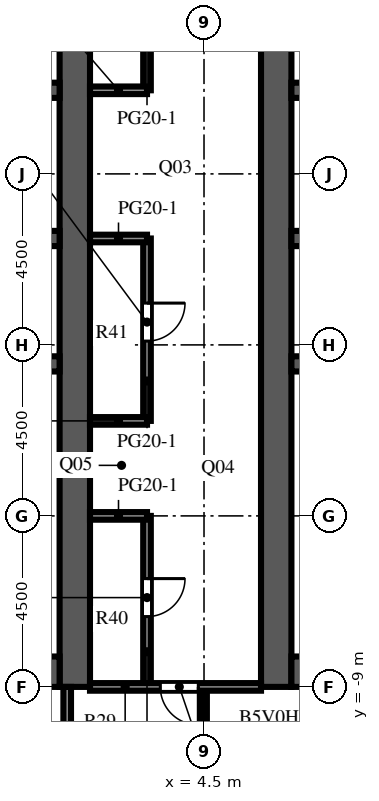
"""IFC4 building model, lengths in metres.
Left out: names, types, materials, properties, quantities, classifications, styles, units other than length and angle.
Written with IfcOpenShell. Run it as: python <this file> out.ifc"""

import sys

from ifc_helpers import new_model, si_unit, direction, frame, frame_2d, origin, place, context, subcontext, project, spatial, rectangle, extrude, element, fill, save


model = new_model("IFC4")
c1 = context("Model", 3, precision=1e-05, world=origin(), true_north=direction((0.0, 1.0)))
c2 = subcontext(c1, "Body", "Model", "MODEL_VIEW")
j1 = project(units=[si_unit("LENGTHUNIT", "METRE"), si_unit("PLANEANGLEUNIT", "RADIAN")], contexts=[c1])
p1 = place(None, origin())
s1 = spatial("IfcSite", under=j1, at=p1, CompositionType="ELEMENT")
p2 = place(p1, origin())
s2 = spatial("IfcBuilding", under=s1, at=p2, CompositionType="ELEMENT")
p3 = place(p2, frame((0.0, 0.0, 156.8)))
s3 = spatial("IfcBuildingStorey", under=s2, at=p3, CompositionType="ELEMENT", Elevation=156.8)
p4 = place(p3, frame((1.1, -9.0, 0.0), z_axis=(0.0, 0.0, 1.0), x_axis=(0.0, 1.0, 0.0)))
e1 = element("IfcWall", 1, at=p4, inside=s3, PredefinedType="SHEAR", context=c2, shape_type="SweptSolid", body=[
    extrude(rectangle(XDim=27.5, YDim=0.8, at=frame_2d((13.75, 0.0))), origin(), (0.0, 0.0, 1.0), 4.1),
])
p5 = place(p4, frame((12.55, 0.0, 0.0)))
e2 = element("IfcOpeningElement", 2, at=p5, cuts=e1, PredefinedType="OPENING", context=c2, shape_type="SweptSolid", body=[
    extrude(rectangle(XDim=2.4, YDim=2.4, at=frame_2d((1.2, 1.2))), frame((0.0, 0.41, 0.0), z_axis=(0.0, -1.0, 0.0), x_axis=(1.0, 0.0, 0.0)), (0.0, 0.0, 1.0), 0.82),
])
p6 = place(p4, frame((5.45, 0.0, 0.0)))
e3 = element("IfcOpeningElement", 3, at=p6, cuts=e1, PredefinedType="OPENING", context=c2, shape_type="SweptSolid", body=[
    extrude(rectangle(XDim=1.2, YDim=2.1, at=frame_2d((0.6, 1.05))), frame((0.0, 0.41, 0.0), z_axis=(0.0, -1.0, 0.0), x_axis=(1.0, 0.0, 0.0)), (0.0, 0.0, 1.0), 0.82),
])
p7 = place(p4, frame((19.45, 0.0, 0.0)))
e4 = element("IfcOpeningElement", 4, at=p7, cuts=e1, PredefinedType="OPENING", context=c2, shape_type="SweptSolid", body=[
    extrude(rectangle(XDim=1.0, YDim=2.1, at=frame_2d((0.5, 1.05))), frame((0.0, 0.41, 0.0), z_axis=(0.0, -1.0, 0.0), x_axis=(1.0, 0.0, 0.0)), (0.0, 0.0, 1.0), 0.82),
])
p8 = place(p4, frame((21.137, 0.0, 0.0)))
e5 = element("IfcOpeningElement", 5, at=p8, cuts=e1, PredefinedType="OPENING", context=c2, shape_type="SweptSolid", body=[
    extrude(rectangle(XDim=1.0, YDim=2.1, at=frame_2d((0.5, 1.05))), frame((0.0, 0.41, 0.0), z_axis=(0.0, -1.0, 0.0), x_axis=(1.0, 0.0, 0.0)), (0.0, 0.0, 1.0), 0.82),
])
p9 = place(p4, frame((23.2, 0.0, 0.0)))
e6 = element("IfcOpeningElement", 6, at=p9, cuts=e1, PredefinedType="OPENING", context=c2, shape_type="SweptSolid", body=[
    extrude(rectangle(XDim=1.0, YDim=2.1, at=frame_2d((0.5, 1.05))), frame((0.0, 0.41, 0.0), z_axis=(0.0, -1.0, 0.0), x_axis=(1.0, 0.0, 0.0)), (0.0, 0.0, 1.0), 0.82),
])
p10 = place(p4, frame((25.262, 0.0, 0.0)))
e7 = element("IfcOpeningElement", 7, at=p10, cuts=e1, PredefinedType="OPENING", context=c2, shape_type="SweptSolid", body=[
    extrude(rectangle(XDim=1.0, YDim=2.1, at=frame_2d((0.5, 1.05))), frame((0.0, 0.41, 0.0), z_axis=(0.0, -1.0, 0.0), x_axis=(1.0, 0.0, 0.0)), (0.0, 0.0, 1.0), 0.82),
])
p11 = place(p3, frame((-9.7, -8.6, 0.0), z_axis=(0.0, 0.0, 1.0), x_axis=(1.0, 0.0, 0.0)))
e8 = element("IfcWall", 8, at=p11, inside=s3, PredefinedType="SHEAR", context=c2, shape_type="SweptSolid", body=[
    extrude(rectangle(XDim=10.4, YDim=0.8, at=frame_2d((5.2, 0.0))), origin(), (0.0, 0.0, 1.0), 4.1),
])
p12 = place(p3, frame((-9.7, -0.5, 0.0), z_axis=(0.0, 0.0, 1.0), x_axis=(1.0, 0.0, 0.0)))
e9 = element("IfcWall", 9, at=p12, inside=s3, PredefinedType="SHEAR", context=c2, shape_type="SweptSolid", body=[
    extrude(rectangle(XDim=10.4, YDim=0.4, at=frame_2d((5.2, 0.0))), origin(), (0.0, 0.0, 1.0), 4.1),
])
p13 = place(p3, frame((-9.7, 2.8, 0.0), z_axis=(0.0, 0.0, 1.0), x_axis=(1.0, 0.0, 0.0)))
e10 = element("IfcWall", 10, at=p13, inside=s3, PredefinedType="SHEAR", context=c2, shape_type="SweptSolid", body=[
    extrude(rectangle(XDim=10.4, YDim=0.4, at=frame_2d((5.2, 0.0))), origin(), (0.0, 0.0, 1.0), 4.1),
])
p14 = place(p13, frame((0.738, 0.0, 0.0)))
e11 = element("IfcOpeningElement", 11, at=p14, cuts=e10, PredefinedType="OPENING", context=c2, shape_type="SweptSolid", body=[
    extrude(rectangle(XDim=1.1, YDim=2.1, at=frame_2d((0.55, 1.05))), frame((0.0, 0.21, 0.0), z_axis=(0.0, -1.0, 0.0), x_axis=(1.0, 0.0, 0.0)), (0.0, 0.0, 1.0), 0.42),
])
p15 = place(p13, frame((3.337, 0.0, 0.0)))
e12 = element("IfcOpeningElement", 12, at=p15, cuts=e10, PredefinedType="OPENING", context=c2, shape_type="SweptSolid", body=[
    extrude(rectangle(XDim=1.1, YDim=2.1, at=frame_2d((0.55, 1.05))), frame((0.0, 0.21, 0.0), z_axis=(0.0, -1.0, 0.0), x_axis=(1.0, 0.0, 0.0)), (0.0, 0.0, 1.0), 0.42),
])
p16 = place(p13, frame((6.012, 0.0, 0.0)))
e13 = element("IfcOpeningElement", 13, at=p16, cuts=e10, PredefinedType="OPENING", context=c2, shape_type="SweptSolid", body=[
    extrude(rectangle(XDim=1.0, YDim=2.1, at=frame_2d((0.5, 1.05))), frame((0.0, 0.21, 0.0), z_axis=(0.0, -1.0, 0.0), x_axis=(1.0, 0.0, 0.0)), (0.0, 0.0, 1.0), 0.42),
])
p17 = place(p13, frame((8.613, 0.0, 0.0)))
e14 = element("IfcOpeningElement", 14, at=p17, cuts=e10, PredefinedType="OPENING", context=c2, shape_type="SweptSolid", body=[
    extrude(rectangle(XDim=1.0, YDim=2.1, at=frame_2d((0.5, 1.05))), frame((0.0, 0.21, 0.0), z_axis=(0.0, -1.0, 0.0), x_axis=(1.0, 0.0, 0.0)), (0.0, 0.0, 1.0), 0.42),
])
p18 = place(p3, frame((-9.7, 6.7, 0.0), z_axis=(0.0, 0.0, 1.0), x_axis=(1.0, 0.0, 0.0)))
e15 = element("IfcWall", 15, at=p18, inside=s3, PredefinedType="SHEAR", context=c2, shape_type="SweptSolid", body=[
    extrude(rectangle(XDim=10.4, YDim=0.4, at=frame_2d((5.2, 0.0))), origin(), (0.0, 0.0, 1.0), 4.1),
])
p19 = place(p18, frame((3.337, 0.0, 0.0)))
e16 = element("IfcOpeningElement", 16, at=p19, cuts=e15, PredefinedType="OPENING", context=c2, shape_type="SweptSolid", body=[
    extrude(rectangle(XDim=1.1, YDim=2.1, at=frame_2d((0.55, 1.05))), frame((0.0, 0.21, 0.0), z_axis=(0.0, -1.0, 0.0), x_axis=(1.0, 0.0, 0.0)), (0.0, 0.0, 1.0), 0.42),
])
p20 = place(p18, frame((5.962, 0.0, 0.0)))
e17 = element("IfcOpeningElement", 17, at=p20, cuts=e15, PredefinedType="OPENING", context=c2, shape_type="SweptSolid", body=[
    extrude(rectangle(XDim=1.1, YDim=2.1, at=frame_2d((0.55, 1.05))), frame((0.0, 0.21, 0.0), z_axis=(0.0, -1.0, 0.0), x_axis=(1.0, 0.0, 0.0)), (0.0, 0.0, 1.0), 0.42),
])
p21 = place(p18, frame((8.663, 0.0, 0.0)))
e18 = element("IfcOpeningElement", 18, at=p21, cuts=e15, PredefinedType="OPENING", context=c2, shape_type="SweptSolid", body=[
    extrude(rectangle(XDim=1.1, YDim=2.1, at=frame_2d((0.55, 1.05))), frame((0.0, 0.21, 0.0), z_axis=(0.0, -1.0, 0.0), x_axis=(1.0, 0.0, 0.0)), (0.0, 0.0, 1.0), 0.42),
])
p22 = place(p18, frame((0.688, 0.0, 0.0)))
e19 = element("IfcOpeningElement", 19, at=p22, cuts=e15, PredefinedType="OPENING", context=c2, shape_type="SweptSolid", body=[
    extrude(rectangle(XDim=1.0, YDim=2.1, at=frame_2d((0.5, 1.05))), frame((0.0, 0.21, 0.0), z_axis=(0.0, -1.0, 0.0), x_axis=(1.0, 0.0, 0.0)), (0.0, 0.0, 1.0), 0.42),
])
p23 = place(p3, frame((6.4, -9.0, 0.0), z_axis=(0.0, 0.0, 1.0), x_axis=(0.0, 1.0, 0.0)))
e20 = element("IfcWall", 20, at=p23, inside=s3, PredefinedType="SHEAR", context=c2, shape_type="SweptSolid", body=[
    extrude(rectangle(XDim=27.5, YDim=0.8, at=frame_2d((13.75, 0.0))), origin(), (0.0, 0.0, 1.0), 4.1),
])
p24 = place(p23, frame((12.55, 0.0, 0.0)))
e21 = element("IfcOpeningElement", 21, at=p24, cuts=e20, PredefinedType="OPENING", context=c2, shape_type="SweptSolid", body=[
    extrude(rectangle(XDim=2.4, YDim=2.4, at=frame_2d((1.2, 1.2))), frame((0.0, 0.41, 0.0), z_axis=(0.0, -1.0, 0.0), x_axis=(1.0, 0.0, 0.0)), (0.0, 0.0, 1.0), 0.82),
])
p25 = place(p23, frame((5.45, 0.0, 0.0)))
e22 = element("IfcOpeningElement", 22, at=p25, cuts=e20, PredefinedType="OPENING", context=c2, shape_type="SweptSolid", body=[
    extrude(rectangle(XDim=1.2, YDim=2.1, at=frame_2d((0.6, 1.05))), frame((0.0, 0.41, 0.0), z_axis=(0.0, -1.0, 0.0), x_axis=(1.0, 0.0, 0.0)), (0.0, 0.0, 1.0), 0.82),
])
p26 = place(p23, frame((19.45, 0.0, 0.0)))
e23 = element("IfcOpeningElement", 23, at=p26, cuts=e20, PredefinedType="OPENING", context=c2, shape_type="SweptSolid", body=[
    extrude(rectangle(XDim=1.0, YDim=2.1, at=frame_2d((0.5, 1.05))), frame((0.0, 0.41, 0.0), z_axis=(0.0, -1.0, 0.0), x_axis=(1.0, 0.0, 0.0)), (0.0, 0.0, 1.0), 0.82),
])
p27 = place(p23, frame((21.137, 0.0, 0.0)))
e24 = element("IfcOpeningElement", 24, at=p27, cuts=e20, PredefinedType="OPENING", context=c2, shape_type="SweptSolid", body=[
    extrude(rectangle(XDim=1.0, YDim=2.1, at=frame_2d((0.5, 1.05))), frame((0.0, 0.41, 0.0), z_axis=(0.0, -1.0, 0.0), x_axis=(1.0, 0.0, 0.0)), (0.0, 0.0, 1.0), 0.82),
])
p28 = place(p23, frame((23.2, 0.0, 0.0)))
e25 = element("IfcOpeningElement", 25, at=p28, cuts=e20, PredefinedType="OPENING", context=c2, shape_type="SweptSolid", body=[
    extrude(rectangle(XDim=1.0, YDim=2.1, at=frame_2d((0.5, 1.05))), frame((0.0, 0.41, 0.0), z_axis=(0.0, -1.0, 0.0), x_axis=(1.0, 0.0, 0.0)), (0.0, 0.0, 1.0), 0.82),
])
p29 = place(p23, frame((25.262, 0.0, 0.0)))
e26 = element("IfcOpeningElement", 26, at=p29, cuts=e20, PredefinedType="OPENING", context=c2, shape_type="SweptSolid", body=[
    extrude(rectangle(XDim=1.0, YDim=2.1, at=frame_2d((0.5, 1.05))), frame((0.0, 0.41, 0.0), z_axis=(0.0, -1.0, 0.0), x_axis=(1.0, 0.0, 0.0)), (0.0, 0.0, 1.0), 0.82),
])
p30 = place(p3, frame((6.8, -8.6, 0.0), z_axis=(0.0, 0.0, 1.0), x_axis=(1.0, 0.0, 0.0)))
e27 = element("IfcWall", 27, at=p30, inside=s3, PredefinedType="SHEAR", context=c2, shape_type="SweptSolid", body=[
    extrude(rectangle(XDim=10.4, YDim=0.8, at=frame_2d((5.2, 0.0))), origin(), (0.0, 0.0, 1.0), 4.1),
])
p31 = place(p3, frame((6.8, -0.5, 0.0), z_axis=(0.0, 0.0, 1.0), x_axis=(1.0, 0.0, 0.0)))
e28 = element("IfcWall", 28, at=p31, inside=s3, PredefinedType="SHEAR", context=c2, shape_type="SweptSolid", body=[
    extrude(rectangle(XDim=10.4, YDim=0.4, at=frame_2d((5.2, 0.0))), origin(), (0.0, 0.0, 1.0), 4.1),
])
p32 = place(p3, frame((6.8, 2.8, 0.0), z_axis=(0.0, 0.0, 1.0), x_axis=(1.0, 0.0, 0.0)))
e29 = element("IfcWall", 29, at=p32, inside=s3, PredefinedType="SHEAR", context=c2, shape_type="SweptSolid", body=[
    extrude(rectangle(XDim=10.4, YDim=0.4, at=frame_2d((5.2, 0.0))), origin(), (0.0, 0.0, 1.0), 4.1),
])
p33 = place(p32, frame((0.738, 0.0, 0.0)))
e30 = element("IfcOpeningElement", 30, at=p33, cuts=e29, PredefinedType="OPENING", context=c2, shape_type="SweptSolid", body=[
    extrude(rectangle(XDim=1.1, YDim=2.1, at=frame_2d((0.55, 1.05))), frame((0.0, 0.21, 0.0), z_axis=(0.0, -1.0, 0.0), x_axis=(1.0, 0.0, 0.0)), (0.0, 0.0, 1.0), 0.42),
])
p34 = place(p32, frame((3.337, 0.0, 0.0)))
e31 = element("IfcOpeningElement", 31, at=p34, cuts=e29, PredefinedType="OPENING", context=c2, shape_type="SweptSolid", body=[
    extrude(rectangle(XDim=1.1, YDim=2.1, at=frame_2d((0.55, 1.05))), frame((0.0, 0.21, 0.0), z_axis=(0.0, -1.0, 0.0), x_axis=(1.0, 0.0, 0.0)), (0.0, 0.0, 1.0), 0.42),
])
p35 = place(p32, frame((6.012, 0.0, 0.0)))
e32 = element("IfcOpeningElement", 32, at=p35, cuts=e29, PredefinedType="OPENING", context=c2, shape_type="SweptSolid", body=[
    extrude(rectangle(XDim=1.0, YDim=2.1, at=frame_2d((0.5, 1.05))), frame((0.0, 0.21, 0.0), z_axis=(0.0, -1.0, 0.0), x_axis=(1.0, 0.0, 0.0)), (0.0, 0.0, 1.0), 0.42),
])
p36 = place(p32, frame((8.613, 0.0, 0.0)))
e33 = element("IfcOpeningElement", 33, at=p36, cuts=e29, PredefinedType="OPENING", context=c2, shape_type="SweptSolid", body=[
    extrude(rectangle(XDim=1.0, YDim=2.1, at=frame_2d((0.5, 1.05))), frame((0.0, 0.21, 0.0), z_axis=(0.0, -1.0, 0.0), x_axis=(1.0, 0.0, 0.0)), (0.0, 0.0, 1.0), 0.42),
])
p37 = place(p3, frame((6.8, 6.7, 0.0), z_axis=(0.0, 0.0, 1.0), x_axis=(1.0, 0.0, 0.0)))
e34 = element("IfcWall", 34, at=p37, inside=s3, PredefinedType="SHEAR", context=c2, shape_type="SweptSolid", body=[
    extrude(rectangle(XDim=10.4, YDim=0.4, at=frame_2d((5.2, 0.0))), origin(), (0.0, 0.0, 1.0), 4.1),
])
p38 = place(p37, frame((3.337, 0.0, 0.0)))
e35 = element("IfcOpeningElement", 35, at=p38, cuts=e34, PredefinedType="OPENING", context=c2, shape_type="SweptSolid", body=[
    extrude(rectangle(XDim=1.1, YDim=2.1, at=frame_2d((0.55, 1.05))), frame((0.0, 0.21, 0.0), z_axis=(0.0, -1.0, 0.0), x_axis=(1.0, 0.0, 0.0)), (0.0, 0.0, 1.0), 0.42),
])
p39 = place(p37, frame((5.962, 0.0, 0.0)))
e36 = element("IfcOpeningElement", 36, at=p39, cuts=e34, PredefinedType="OPENING", context=c2, shape_type="SweptSolid", body=[
    extrude(rectangle(XDim=1.1, YDim=2.1, at=frame_2d((0.55, 1.05))), frame((0.0, 0.21, 0.0), z_axis=(0.0, -1.0, 0.0), x_axis=(1.0, 0.0, 0.0)), (0.0, 0.0, 1.0), 0.42),
])
p40 = place(p37, frame((8.663, 0.0, 0.0)))
e37 = element("IfcOpeningElement", 37, at=p40, cuts=e34, PredefinedType="OPENING", context=c2, shape_type="SweptSolid", body=[
    extrude(rectangle(XDim=1.1, YDim=2.1, at=frame_2d((0.55, 1.05))), frame((0.0, 0.21, 0.0), z_axis=(0.0, -1.0, 0.0), x_axis=(1.0, 0.0, 0.0)), (0.0, 0.0, 1.0), 0.42),
])
p41 = place(p37, frame((0.688, 0.0, 0.0)))
e38 = element("IfcOpeningElement", 38, at=p41, cuts=e34, PredefinedType="OPENING", context=c2, shape_type="SweptSolid", body=[
    extrude(rectangle(XDim=1.0, YDim=2.1, at=frame_2d((0.5, 1.05))), frame((0.0, 0.21, 0.0), z_axis=(0.0, -1.0, 0.0), x_axis=(1.0, 0.0, 0.0)), (0.0, 0.0, 1.0), 0.42),
])
p42 = place(p3, frame((-0.8, -5.2, 0.0), z_axis=(0.0, 0.0, 1.0), x_axis=(1.0, 0.0, 0.0)))
e39 = element("IfcWall", 39, at=p42, inside=s3, PredefinedType="PARTITIONING", context=c2, shape_type="SweptSolid", body=[
    extrude(rectangle(XDim=1.5, YDim=0.1, at=frame_2d((0.75, 0.0))), origin(), (0.0, 0.0, 1.0), 3.65),
])
p43 = place(p42, frame((0.25, 0.0, 0.0)))
e40 = element("IfcOpeningElement", 40, at=p43, cuts=e39, PredefinedType="OPENING", context=c2, shape_type="SweptSolid", body=[
    extrude(rectangle(XDim=1.0, YDim=2.1, at=frame_2d((0.5, 1.05))), frame((0.0, 0.06, 0.0), z_axis=(0.0, -1.0, 0.0), x_axis=(1.0, 0.0, 0.0)), (0.0, 0.0, 1.0), 0.12),
])
p44 = place(p3, frame((6.8, -5.2, 0.0), z_axis=(0.0, 0.0, 1.0), x_axis=(1.0, 0.0, 0.0)))
e41 = element("IfcWall", 41, at=p44, inside=s3, PredefinedType="PARTITIONING", context=c2, shape_type="SweptSolid", body=[
    extrude(rectangle(XDim=1.5, YDim=0.1, at=frame_2d((0.75, 0.0))), origin(), (0.0, 0.0, 1.0), 3.65),
])
p45 = place(p44, frame((0.25, 0.0, 0.0)))
e42 = element("IfcOpeningElement", 42, at=p45, cuts=e41, PredefinedType="OPENING", context=c2, shape_type="SweptSolid", body=[
    extrude(rectangle(XDim=1.0, YDim=2.1, at=frame_2d((0.5, 1.05))), frame((0.0, 0.06, 0.0), z_axis=(0.0, -1.0, 0.0), x_axis=(1.0, 0.0, 0.0)), (0.0, 0.0, 1.0), 0.12),
])
p46 = place(p3, frame((0.9, -26.85, 0.0), z_axis=(0.0, 0.0, 1.0), x_axis=(0.0, 1.0, 0.0)))
e43 = element("IfcWall", 43, at=p46, inside=s3, PredefinedType="PARTITIONING", context=c2, shape_type="SweptSolid", body=[
    extrude(rectangle(XDim=17.85, YDim=0.2, at=frame_2d((8.925, 0.0))), origin(), (0.0, 0.0, 1.0), 3.65),
])
p47 = place(p3, frame((3.0, -9.0, 0.0), z_axis=(0.0, 0.0, 1.0), x_axis=(0.0, 1.0, 0.0)))
e44 = element("IfcWall", 44, at=p47, inside=s3, PredefinedType="PARTITIONING", context=c2, shape_type="SweptSolid", body=[
    extrude(rectangle(XDim=4.5, YDim=0.2, at=frame_2d((2.25, 0.0))), origin(), (0.0, 0.0, 1.0), 3.65),
])
p48 = place(p47, frame((1.85, 0.0, 0.0)))
e45 = element("IfcOpeningElement", 45, at=p48, cuts=e44, PredefinedType="OPENING", context=c2, shape_type="SweptSolid", body=[
    extrude(rectangle(XDim=1.0, YDim=2.1, at=frame_2d((0.5, 1.05))), frame((0.0, 0.11, 0.0), z_axis=(0.0, -1.0, 0.0), x_axis=(1.0, 0.0, 0.0)), (0.0, 0.0, 1.0), 0.22),
])
p49 = place(p3, frame((3.0, -2.0, 0.0), z_axis=(0.0, 0.0, 1.0), x_axis=(0.0, 1.0, 0.0)))
e46 = element("IfcWall", 46, at=p49, inside=s3, PredefinedType="PARTITIONING", context=c2, shape_type="SweptSolid", body=[
    extrude(rectangle(XDim=4.8, YDim=0.2, at=frame_2d((2.4, 0.0))), origin(), (0.0, 0.0, 1.0), 3.65),
])
p50 = place(p49, frame((2.1, 0.0, 0.0)))
e47 = element("IfcOpeningElement", 47, at=p50, cuts=e46, PredefinedType="OPENING", context=c2, shape_type="SweptSolid", body=[
    extrude(rectangle(XDim=1.0, YDim=2.1, at=frame_2d((0.5, 1.05))), frame((0.0, 0.11, 0.0), z_axis=(0.0, -1.0, 0.0), x_axis=(1.0, 0.0, 0.0)), (0.0, 0.0, 1.0), 0.22),
])
p51 = place(p3, frame((3.0, 6.7, 0.0), z_axis=(0.0, 0.0, 1.0), x_axis=(0.0, 1.0, 0.0)))
e48 = element("IfcWall", 48, at=p51, inside=s3, PredefinedType="PARTITIONING", context=c2, shape_type="SweptSolid", body=[
    extrude(rectangle(XDim=11.8, YDim=0.2, at=frame_2d((5.9, 0.0))), origin(), (0.0, 0.0, 1.0), 3.65),
])
p52 = place(p51, frame((6.1, 0.0, 0.0)))
e49 = element("IfcOpeningElement", 49, at=p52, cuts=e48, PredefinedType="OPENING", context=c2, shape_type="SweptSolid", body=[
    extrude(rectangle(XDim=1.0, YDim=2.1, at=frame_2d((0.5, 1.05))), frame((0.0, 0.11, 0.0), z_axis=(0.0, -1.0, 0.0), x_axis=(1.0, 0.0, 0.0)), (0.0, 0.0, 1.0), 0.22),
])
p53 = place(p3, frame((4.5, -9.0, 0.0), z_axis=(0.0, 0.0, 1.0), x_axis=(0.0, -1.0, 0.0)))
e50 = element("IfcWall", 50, at=p53, inside=s3, PredefinedType="PARTITIONING", context=c2, shape_type="SweptSolid", body=[
    extrude(rectangle(XDim=13.0, YDim=0.15, at=frame_2d((6.5, 0.0))), origin(), (0.0, 0.0, 1.0), 3.65),
])
p54 = place(p53, frame((6.6, 0.0, 0.0)))
e51 = element("IfcOpeningElement", 51, at=p54, cuts=e50, PredefinedType="OPENING", context=c2, shape_type="SweptSolid", body=[
    extrude(rectangle(XDim=1.0, YDim=2.1, at=frame_2d((0.5, 1.05))), frame((0.0, 0.085, 0.0), z_axis=(0.0, -1.0, 0.0), x_axis=(1.0, 0.0, 0.0)), (0.0, 0.0, 1.0), 0.17),
])
p55 = place(p3, frame((6.0, -9.0, 0.0), z_axis=(0.0, 0.0, 1.0), x_axis=(-1.0, 0.0, 0.0)))
e52 = element("IfcWall", 52, at=p55, inside=s3, PredefinedType="PARTITIONING", context=c2, shape_type="SweptSolid", body=[
    extrude(rectangle(XDim=4.5, YDim=0.2, at=frame_2d((2.25, 0.0))), origin(), (0.0, 0.0, 1.0), 3.65),
])
p56 = place(p55, frame((1.65, 0.0, 0.0)))
e53 = element("IfcOpeningElement", 53, at=p56, cuts=e52, PredefinedType="OPENING", context=c2, shape_type="SweptSolid", body=[
    extrude(rectangle(XDim=1.0, YDim=2.1, at=frame_2d((0.5, 1.05))), frame((0.0, 0.11, 0.0), z_axis=(0.0, -1.0, 0.0), x_axis=(1.0, 0.0, 0.0)), (0.0, 0.0, 1.0), 0.22),
])
for number, where, z_axis, x_axis in (
    (54, (1.5, -4.5, 0.0), (0.0, 0.0, 1.0), (1.0, 0.0, 0.0)),
    (55, (1.5, -2.0, 0.0), (0.0, 0.0, 1.0), (1.0, 0.0, 0.0)),
    (56, (1.5, 2.8, 0.0), (0.0, 0.0, 1.0), (1.0, 0.0, 0.0)),
    (57, (1.5, 6.7, 0.0), (0.0, 0.0, 1.0), (1.0, 0.0, 0.0)),
):
    element("IfcWall", number, at=place(p3, frame(where, z_axis=z_axis, x_axis=x_axis)), inside=s3, PredefinedType="PARTITIONING", context=c2, shape_type="SweptSolid", body=[
        extrude(rectangle(XDim=1.5, YDim=0.2, at=frame_2d((0.75, 0.0))), origin(), (0.0, 0.0, 1.0), 3.65),
    ])
p57 = place(p5, origin())
e58 = element("IfcDoor", 58, at=p57, inside=s3, OperationType="DOUBLE_DOOR_DOUBLE_SWING", PredefinedType="DOOR", context=c2, shape_type="SweptSolid", body=[
    extrude(rectangle(XDim=2.4, YDim=2.4, at=frame_2d((1.2, 1.2))), frame((0.0, 0.025, 0.0), z_axis=(0.0, -1.0, 0.0), x_axis=(1.0, 0.0, 0.0)), (0.0, 0.0, 1.0), 0.05),
])
fill(e2, e58)
p58 = place(p24, origin())
e59 = element("IfcDoor", 59, at=p58, inside=s3, OperationType="DOUBLE_DOOR_DOUBLE_SWING", PredefinedType="DOOR", context=c2, shape_type="SweptSolid", body=[
    extrude(rectangle(XDim=2.4, YDim=2.4, at=frame_2d((1.2, 1.2))), frame((0.0, 0.025, 0.0), z_axis=(0.0, -1.0, 0.0), x_axis=(1.0, 0.0, 0.0)), (0.0, 0.0, 1.0), 0.05),
])
fill(e21, e59)
p59 = place(p6, origin())
e60 = element("IfcDoor", 60, at=p59, inside=s3, OperationType="SINGLE_SWING_LEFT", PredefinedType="DOOR", context=c2, shape_type="SweptSolid", body=[
    extrude(rectangle(XDim=1.2, YDim=2.1, at=frame_2d((0.6, 1.05))), frame((0.0, 0.375, 0.0), z_axis=(0.0, -1.0, 0.0), x_axis=(1.0, 0.0, 0.0)), (0.0, 0.0, 1.0), 0.05),
])
fill(e3, e60)
p60 = place(p25, origin())
e61 = element("IfcDoor", 61, at=p60, inside=s3, OperationType="SINGLE_SWING_RIGHT", PredefinedType="DOOR", context=c2, shape_type="SweptSolid", body=[
    extrude(rectangle(XDim=1.2, YDim=2.1, at=frame_2d((0.6, 1.05))), frame((0.0, -0.325, 0.0), z_axis=(0.0, -1.0, 0.0), x_axis=(1.0, 0.0, 0.0)), (0.0, 0.0, 1.0), 0.05),
])
fill(e22, e61)
p61 = place(p56, origin())
e62 = element("IfcDoor", 62, at=p61, inside=s3, OperationType="SINGLE_SWING_LEFT", PredefinedType="DOOR", context=c2, shape_type="SweptSolid", body=[
    extrude(rectangle(XDim=1.0, YDim=2.1, at=frame_2d((0.5, 1.05))), frame((0.0, 0.025, 0.0), z_axis=(0.0, -1.0, 0.0), x_axis=(1.0, 0.0, 0.0)), (0.0, 0.0, 1.0), 0.05),
])
fill(e53, e62)
p62 = place(p48, origin())
e63 = element("IfcDoor", 63, at=p62, inside=s3, OperationType="SINGLE_SWING_RIGHT", PredefinedType="DOOR", context=c2, shape_type="SweptSolid", body=[
    extrude(rectangle(XDim=1.0, YDim=2.1, at=frame_2d((0.5, 1.05))), frame((0.0, 0.025, 0.0), z_axis=(0.0, -1.0, 0.0), x_axis=(1.0, 0.0, 0.0)), (0.0, 0.0, 1.0), 0.05),
])
fill(e45, e63)
p63 = place(p50, origin())
e64 = element("IfcDoor", 64, at=p63, inside=s3, OperationType="SINGLE_SWING_RIGHT", PredefinedType="DOOR", context=c2, shape_type="SweptSolid", body=[
    extrude(rectangle(XDim=1.0, YDim=2.1, at=frame_2d((0.5, 1.05))), frame((0.0, 0.025, 0.0), z_axis=(0.0, -1.0, 0.0), x_axis=(1.0, 0.0, 0.0)), (0.0, 0.0, 1.0), 0.05),
])
fill(e47, e64)
save(model, sys.argv[1])
